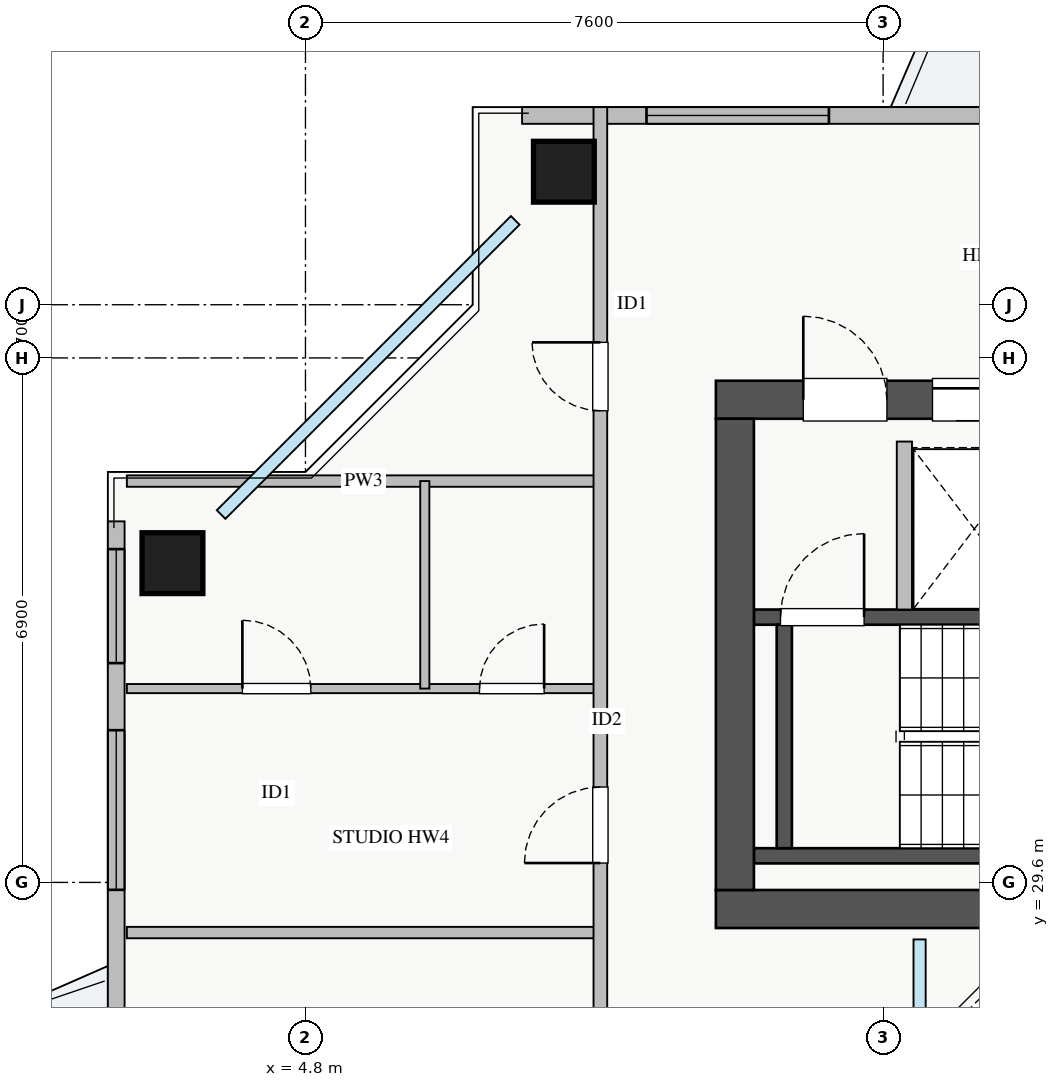
"""IFC4 building model, lengths in metres.
Left out: names, types, materials, properties, quantities, classifications, styles, units other than length and angle.
Written with IfcOpenShell. Run it as: python <this file> out.ifc"""

import sys

from ifc_helpers import new_model, si_unit, direction, frame, frame_2d, origin, origin_2d, place, context, subcontext, project, spatial, rectangle, extrude, source, transform, mapped, element, fill, save


model = new_model("IFC4")
c1 = context("Model", 3, precision=1e-05, world=origin(), true_north=direction((0.0, 1.0)))
c2 = subcontext(c1, "Body", "Model", "MODEL_VIEW")
j1 = project(units=[si_unit("LENGTHUNIT", "METRE"), si_unit("PLANEANGLEUNIT", "RADIAN")], contexts=[c1])
p1 = place(None, origin())
s1 = spatial("IfcSite", under=j1, at=p1, CompositionType="ELEMENT")
p2 = place(p1, origin())
s2 = spatial("IfcBuilding", under=s1, at=p2, CompositionType="ELEMENT")
p3 = place(p2, frame((0.0, 0.0, 216.5)))
s3 = spatial("IfcBuildingStorey", under=s2, at=p3, CompositionType="ELEMENT", Elevation=216.5)
p4 = place(p3, frame((12.68, 33.2, 0.0), z_axis=(0.0, 0.0, 1.0), x_axis=(1.0, 0.0, 0.0)))
e1 = element("IfcWall", 1, at=p4, inside=s3, PredefinedType="SHEAR", context=c2, shape_type="SweptSolid", body=[
    extrude(rectangle(XDim=1.94, YDim=0.18, at=frame_2d((0.97, 0.0))), origin(), (0.0, 0.0, 1.0), 3.07),
])
p5 = place(p3, frame((10.7, 29.95, 0.0), z_axis=(0.0, 0.0, 1.0), x_axis=(1.0, 0.0, 0.0)))
e2 = element("IfcWall", 2, at=p5, inside=s3, PredefinedType="SHEAR", context=c2, shape_type="SweptSolid", body=[
    extrude(rectangle(XDim=7.45, YDim=0.2, at=frame_2d((3.725, 0.0))), origin(), (0.0, 0.0, 1.0), 3.25),
])
p6 = place(p3, frame((10.7, 33.09, 0.0), z_axis=(0.0, 0.0, 1.0), x_axis=(1.0, 0.0, 0.0)))
e3 = element("IfcWall", 3, at=p6, inside=s3, PredefinedType="SHEAR", context=c2, shape_type="SweptSolid", body=[
    extrude(rectangle(XDim=7.45, YDim=0.2, at=frame_2d((3.725, 0.0))), origin(), (0.0, 0.0, 1.0), 3.25),
])
p7 = place(p6, frame((0.35, 0.0, 0.0)))
e4 = element("IfcOpeningElement", 4, at=p7, cuts=e3, PredefinedType="OPENING", context=c2, shape_type="SweptSolid", body=[
    extrude(rectangle(XDim=1.1, YDim=2.05, at=frame_2d((0.55, 1.025))), frame((0.0, 0.11, 0.0), z_axis=(0.0, -1.0, 0.0), x_axis=(1.0, 0.0, 0.0)), (0.0, 0.0, 1.0), 0.22),
])
p8 = place(p3, frame((11.1, 30.05, 0.0), z_axis=(0.0, 0.0, 1.0), x_axis=(0.0, 1.0, 0.0)))
e5 = element("IfcWall", 5, at=p8, inside=s3, PredefinedType="SHEAR", context=c2, shape_type="SweptSolid", body=[
    extrude(rectangle(XDim=2.94, YDim=0.2, at=frame_2d((1.47, 0.0))), origin(), (0.0, 0.0, 1.0), 3.25),
])
p9 = place(p3, frame((10.2, 29.25, 0.0), z_axis=(0.0, 0.0, 1.0), x_axis=(1.0, 0.0, 0.0)))
e6 = element("IfcWall", 6, at=p9, inside=s3, PredefinedType="SHEAR", context=c2, shape_type="SweptSolid", body=[
    extrude(rectangle(XDim=17.6, YDim=0.5, at=frame_2d((8.8, 0.0))), origin(), (0.0, 0.0, 1.0), 3.25),
])
p10 = place(p3, frame((10.2, 35.95, 0.0), z_axis=(0.0, 0.0, 1.0), x_axis=(1.0, 0.0, 0.0)))
e7 = element("IfcWall", 7, at=p10, inside=s3, PredefinedType="SHEAR", context=c2, shape_type="SweptSolid", body=[
    extrude(rectangle(XDim=17.6, YDim=0.5, at=frame_2d((8.8, 0.0))), origin(), (0.0, 0.0, 1.0), 3.25),
])
p11 = place(p10, frame((1.15, 0.0, 0.0)))
e8 = element("IfcOpeningElement", 8, at=p11, cuts=e7, PredefinedType="OPENING", context=c2, shape_type="SweptSolid", body=[
    extrude(rectangle(XDim=1.1, YDim=2.05, at=frame_2d((0.55, 1.025))), frame((0.0, 0.26, 0.0), z_axis=(0.0, -1.0, 0.0), x_axis=(1.0, 0.0, 0.0)), (0.0, 0.0, 1.0), 0.52),
])
p12 = place(p10, frame((8.3, 0.0, 0.0)))
e9 = element("IfcOpeningElement", 9, at=p12, cuts=e7, PredefinedType="OPENING", context=c2, shape_type="SweptSolid", body=[
    extrude(rectangle(XDim=1.1, YDim=2.05, at=frame_2d((0.55, 1.025))), frame((0.0, 0.26, 0.0), z_axis=(0.0, -1.0, 0.0), x_axis=(1.0, 0.0, 0.0)), (0.0, 0.0, 1.0), 0.52),
])
p13 = place(p10, frame((2.85, 0.0, 0.0)))
e10 = element("IfcOpeningElement", 10, at=p13, cuts=e7, PredefinedType="OPENING", context=c2, shape_type="SweptSolid", body=[
    extrude(rectangle(XDim=1.1, YDim=2.05, at=frame_2d((0.55, 1.025))), frame((0.0, 0.26, 0.0), z_axis=(0.0, -1.0, 0.0), x_axis=(1.0, 0.0, 0.0)), (0.0, 0.0, 1.0), 0.52),
])
p14 = place(p10, frame((5.8, 0.0, 0.0)))
e11 = element("IfcOpeningElement", 11, at=p14, cuts=e7, PredefinedType="OPENING", context=c2, shape_type="SweptSolid", body=[
    extrude(rectangle(XDim=1.0, YDim=2.05, at=frame_2d((0.5, 1.025))), frame((0.0, 0.26, 0.0), z_axis=(0.0, -1.0, 0.0), x_axis=(1.0, 0.0, 0.0)), (0.0, 0.0, 1.0), 0.52),
])
p15 = place(p10, frame((14.74, 0.0, 0.0)))
e12 = element("IfcOpeningElement", 12, at=p15, cuts=e7, PredefinedType="OPENING", context=c2, shape_type="SweptSolid", body=[
    extrude(rectangle(XDim=1.0, YDim=2.05, at=frame_2d((0.5, 1.025))), frame((0.0, 0.26, 0.0), z_axis=(0.0, -1.0, 0.0), x_axis=(1.0, 0.0, 0.0)), (0.0, 0.0, 1.0), 0.52),
])
p16 = place(p10, frame((10.175, 0.0, 0.0)))
e13 = element("IfcOpeningElement", 13, at=p16, cuts=e7, PredefinedType="OPENING", context=c2, shape_type="SweptSolid", body=[
    extrude(rectangle(XDim=1.0, YDim=2.05, at=frame_2d((0.5, 1.025))), frame((0.0, 0.26, 0.0), z_axis=(0.0, -1.0, 0.0), x_axis=(1.0, 0.0, 0.0)), (0.0, 0.0, 1.0), 0.52),
])
p17 = place(p10, frame((12.625, 0.0, 0.0)))
e14 = element("IfcOpeningElement", 14, at=p17, cuts=e7, PredefinedType="OPENING", context=c2, shape_type="SweptSolid", body=[
    extrude(rectangle(XDim=1.0, YDim=2.05, at=frame_2d((0.5, 1.025))), frame((0.0, 0.26, 0.0), z_axis=(0.0, -1.0, 0.0), x_axis=(1.0, 0.0, 0.0)), (0.0, 0.0, 1.0), 0.52),
])
p18 = place(p3, frame((10.45, 29.5, 0.0), z_axis=(0.0, 0.0, 1.0), x_axis=(0.0, 1.0, 0.0)))
e15 = element("IfcWall", 15, at=p18, inside=s3, PredefinedType="SHEAR", context=c2, shape_type="SweptSolid", body=[
    extrude(rectangle(XDim=6.2, YDim=0.5, at=frame_2d((3.1, 0.0))), origin(), (0.0, 0.0, 1.0), 3.25),
])
m1 = source(origin(), c2, "Body", "SweptSolid", [
    extrude(rectangle(XDim=0.8, YDim=0.8, at=origin_2d()), origin(), (0.0, 0.0, 1.0), 3.25),
])
for number, where, z_axis, x_axis in (
    (16, (8.2, 38.95, 0.0), (0.0, 0.0, 1.0), (1.0, 0.0, 0.0)),
    (17, (3.05, 33.8, 0.0), (0.0, 0.0, 1.0), (1.0, 0.0, 0.0)),
):
    element("IfcColumn", number, at=place(p3, frame(where, z_axis=z_axis, x_axis=x_axis)), inside=s3, PredefinedType="COLUMN", context=c2, shape_type="MappedRepresentation", body=[
        mapped(m1, transform((0.0, 0.0, 0.0), x_axis=(1.0, 0.0, 0.0), y_axis=(0.0, 1.0, 0.0), z_axis=(0.0, 0.0, 1.0), scale=1.0)),
    ])
p19 = place(p3, frame((7.65, 39.69, 0.0), z_axis=(0.0, 0.0, 1.0), x_axis=(1.0, 0.0, 0.0)))
e18 = element("IfcWall", 18, at=p19, inside=s3, PredefinedType="STANDARD", context=c2, shape_type="SweptSolid", body=[
    extrude(rectangle(XDim=22.7, YDim=0.22, at=frame_2d((11.35, 0.0))), origin(), (0.0, 0.0, 1.0), 2.61),
])
p20 = place(p19, frame((12.2, 0.0, 0.0)))
e19 = element("IfcOpeningElement", 19, at=p20, cuts=e18, PredefinedType="OPENING", context=c2, shape_type="SweptSolid", body=[
    extrude(rectangle(XDim=1.2, YDim=2.1, at=frame_2d((0.6, 1.05))), frame((0.0, 0.12, 0.0), z_axis=(0.0, -1.0, 0.0), x_axis=(1.0, 0.0, 0.0)), (0.0, 0.0, 1.0), 0.24),
])
p21 = place(p19, frame((1.637, 0.0, 0.9)))
e20 = element("IfcOpeningElement", 20, at=p21, cuts=e18, PredefinedType="OPENING", context=c2, shape_type="SweptSolid", body=[
    extrude(rectangle(XDim=2.4, YDim=1.48, at=frame_2d((1.2, 0.74))), frame((0.0, 0.12, 0.0), z_axis=(0.0, -1.0, 0.0), x_axis=(1.0, 0.0, 0.0)), (0.0, 0.0, 1.0), 0.24),
])
p22 = place(p19, frame((7.612, 0.0, 0.9)))
e21 = element("IfcOpeningElement", 21, at=p22, cuts=e18, PredefinedType="OPENING", context=c2, shape_type="SweptSolid", body=[
    extrude(rectangle(XDim=1.8, YDim=1.45, at=frame_2d((0.9, 0.725))), frame((0.0, 0.12, 0.0), z_axis=(0.0, -1.0, 0.0), x_axis=(1.0, 0.0, 0.0)), (0.0, 0.0, 1.0), 0.24),
])
p23 = place(p19, frame((20.038, 0.0, 0.9)))
e22 = element("IfcOpeningElement", 22, at=p23, cuts=e18, PredefinedType="OPENING", context=c2, shape_type="SweptSolid", body=[
    extrude(rectangle(XDim=2.1, YDim=1.5, at=frame_2d((1.05, 0.75))), frame((0.0, 0.12, 0.0), z_axis=(0.0, -1.0, 0.0), x_axis=(1.0, 0.0, 0.0)), (0.0, 0.0, 1.0), 0.24),
])
p24 = place(p19, frame((16.42, 0.0, 0.9)))
e23 = element("IfcOpeningElement", 23, at=p24, cuts=e18, PredefinedType="OPENING", context=c2, shape_type="SweptSolid", body=[
    extrude(rectangle(XDim=2.4, YDim=1.5, at=frame_2d((1.2, 0.75))), frame((0.0, 0.12, 0.0), z_axis=(0.0, -1.0, 0.0), x_axis=(1.0, 0.0, 0.0)), (0.0, 0.0, 1.0), 0.24),
])
p25 = place(p3, frame((2.31, 11.65, 0.0), z_axis=(0.0, 0.0, 1.0), x_axis=(0.0, 1.0, 0.0)))
e24 = element("IfcWall", 24, at=p25, inside=s3, PredefinedType="STANDARD", context=c2, shape_type="SweptSolid", body=[
    extrude(rectangle(XDim=22.7, YDim=0.22, at=frame_2d((11.35, 0.0))), origin(), (0.0, 0.0, 1.0), 2.61),
])
p26 = place(p25, frame((12.2, 0.0, 0.0)))
e25 = element("IfcOpeningElement", 25, at=p26, cuts=e24, PredefinedType="OPENING", context=c2, shape_type="SweptSolid", body=[
    extrude(rectangle(XDim=1.2, YDim=2.1, at=frame_2d((0.6, 1.05))), frame((0.0, 0.12, 0.0), z_axis=(0.0, -1.0, 0.0), x_axis=(1.0, 0.0, 0.0)), (0.0, 0.0, 1.0), 0.24),
])
p27 = place(p25, frame((2.607, 0.0, 0.9)))
e26 = element("IfcOpeningElement", 26, at=p27, cuts=e24, PredefinedType="OPENING", context=c2, shape_type="SweptSolid", body=[
    extrude(rectangle(XDim=1.8, YDim=1.5, at=frame_2d((0.9, 0.75))), frame((0.0, 0.12, 0.0), z_axis=(0.0, -1.0, 0.0), x_axis=(1.0, 0.0, 0.0)), (0.0, 0.0, 1.0), 0.24),
])
p28 = place(p25, frame((17.853, 0.0, 0.9)))
e27 = element("IfcOpeningElement", 27, at=p28, cuts=e24, PredefinedType="OPENING", context=c2, shape_type="SweptSolid", body=[
    extrude(rectangle(XDim=2.1, YDim=1.5, at=frame_2d((1.05, 0.75))), frame((0.0, 0.12, 0.0), z_axis=(0.0, -1.0, 0.0), x_axis=(1.0, 0.0, 0.0)), (0.0, 0.0, 1.0), 0.24),
])
p29 = place(p25, frame((0.385, 0.0, 0.9)))
e28 = element("IfcOpeningElement", 28, at=p29, cuts=e24, PredefinedType="OPENING", context=c2, shape_type="SweptSolid", body=[
    extrude(rectangle(XDim=1.5, YDim=1.5, at=frame_2d((0.75, 0.75))), frame((0.0, 0.12, 0.0), z_axis=(0.0, -1.0, 0.0), x_axis=(1.0, 0.0, 0.0)), (0.0, 0.0, 1.0), 0.24),
])
p30 = place(p25, frame((20.835, 0.0, 0.9)))
e29 = element("IfcOpeningElement", 29, at=p30, cuts=e24, PredefinedType="OPENING", context=c2, shape_type="SweptSolid", body=[
    extrude(rectangle(XDim=1.5, YDim=1.5, at=frame_2d((0.75, 0.75))), frame((0.0, 0.12, 0.0), z_axis=(0.0, -1.0, 0.0), x_axis=(1.0, 0.0, 0.0)), (0.0, 0.0, 1.0), 0.24),
])
p31 = place(p25, frame((5.025, 0.0, 0.9)))
e30 = element("IfcOpeningElement", 30, at=p31, cuts=e24, PredefinedType="OPENING", context=c2, shape_type="SweptSolid", body=[
    extrude(rectangle(XDim=0.9, YDim=1.2, at=frame_2d((0.45, 0.6))), frame((0.0, 0.12, 0.0), z_axis=(0.0, -1.0, 0.0), x_axis=(1.0, 0.0, 0.0)), (0.0, 0.0, 1.0), 0.24),
])
p32 = place(p3, frame((12.68, 33.19, 0.0), z_axis=(0.0, 0.0, 1.0), x_axis=(0.0, 1.0, 0.0)))
e31 = element("IfcWall", 31, at=p32, inside=s3, PredefinedType="PARTITIONING", context=c2, shape_type="SweptSolid", body=[
    extrude(rectangle(XDim=2.21, YDim=0.2, at=frame_2d((1.105, 0.0))), origin(), (0.0, 0.0, 1.0), 3.07),
])
p33 = place(p3, frame((2.45, 34.88, 0.0), z_axis=(0.0, 0.0, 1.0), x_axis=(1.0, 0.0, 0.0)))
e32 = element("IfcWall", 32, at=p33, inside=s3, PredefinedType="PARTITIONING", context=c2, shape_type="SweptSolid", body=[
    extrude(rectangle(XDim=6.23, YDim=0.15, at=frame_2d((3.115, 0.0))), origin(), (0.0, 0.0, 1.0), 3.07),
])
p34 = place(p3, frame((2.45, 32.15, 0.0), z_axis=(0.0, 0.0, 1.0), x_axis=(1.0, 0.0, 0.0)))
e33 = element("IfcWall", 33, at=p34, inside=s3, PredefinedType="PLUMBINGWALL", context=c2, shape_type="SweptSolid", body=[
    extrude(rectangle(XDim=6.23, YDim=0.12, at=frame_2d((3.115, 0.0))), origin(), (0.0, 0.0, 1.0), 3.07),
])
p35 = place(p34, frame((1.52, 0.0, 0.0)))
e34 = element("IfcOpeningElement", 34, at=p35, cuts=e33, PredefinedType="OPENING", context=c2, shape_type="SweptSolid", body=[
    extrude(rectangle(XDim=0.9, YDim=2.05, at=frame_2d((0.45, 1.025))), frame((0.0, 0.07, 0.0), z_axis=(0.0, -1.0, 0.0), x_axis=(1.0, 0.0, 0.0)), (0.0, 0.0, 1.0), 0.14),
])
p36 = place(p34, frame((4.64, 0.0, 0.0)))
e35 = element("IfcOpeningElement", 35, at=p36, cuts=e33, PredefinedType="OPENING", context=c2, shape_type="SweptSolid", body=[
    extrude(rectangle(XDim=0.85, YDim=2.05, at=frame_2d((0.425, 1.025))), frame((0.0, 0.07, 0.0), z_axis=(0.0, -1.0, 0.0), x_axis=(1.0, 0.0, 0.0)), (0.0, 0.0, 1.0), 0.14),
])
p37 = place(p3, frame((6.37, 32.15, 0.0), z_axis=(0.0, 0.0, 1.0), x_axis=(0.0, 1.0, 0.0)))
e36 = element("IfcWall", 36, at=p37, inside=s3, PredefinedType="PLUMBINGWALL", context=c2, shape_type="SweptSolid", body=[
    extrude(rectangle(XDim=2.73, YDim=0.12, at=frame_2d((1.365, 0.0))), origin(), (0.0, 0.0, 1.0), 3.07),
])
p38 = place(p3, frame((2.45, 28.94, 0.0), z_axis=(0.0, 0.0, 1.0), x_axis=(1.0, 0.0, 0.0)))
e37 = element("IfcWall", 37, at=p38, inside=s3, PredefinedType="PARTITIONING", context=c2, shape_type="SweptSolid", body=[
    extrude(rectangle(XDim=6.23, YDim=0.15, at=frame_2d((3.115, 0.0))), origin(), (0.0, 0.0, 1.0), 3.07),
])
p39 = place(p3, frame((8.68, 6.2, 0.0), z_axis=(0.0, 0.0, 1.0), x_axis=(0.0, 1.0, 0.0)))
e38 = element("IfcWall", 38, at=p39, inside=s3, PredefinedType="PARTITIONING", context=c2, shape_type="SweptSolid", body=[
    extrude(rectangle(XDim=33.6, YDim=0.18, at=frame_2d((16.8, 0.0))), origin(), (0.0, 0.0, 1.0), 3.07),
])
p40 = place(p39, frame((29.605, 0.0, 0.0)))
e39 = element("IfcOpeningElement", 39, at=p40, cuts=e38, PredefinedType="OPENING", context=c2, shape_type="SweptSolid", body=[
    extrude(rectangle(XDim=0.9, YDim=2.05, at=frame_2d((0.45, 1.025))), frame((0.0, 0.1, 0.0), z_axis=(0.0, -1.0, 0.0), x_axis=(1.0, 0.0, 0.0)), (0.0, 0.0, 1.0), 0.2),
])
p41 = place(p39, frame((2.92, 0.0, 0.0)))
e40 = element("IfcOpeningElement", 40, at=p41, cuts=e38, PredefinedType="OPENING", context=c2, shape_type="SweptSolid", body=[
    extrude(rectangle(XDim=0.9, YDim=2.05, at=frame_2d((0.45, 1.025))), frame((0.0, 0.1, 0.0), z_axis=(0.0, -1.0, 0.0), x_axis=(1.0, 0.0, 0.0)), (0.0, 0.0, 1.0), 0.2),
])
p42 = place(p39, frame((5.615, 0.0, 0.0)))
e41 = element("IfcOpeningElement", 41, at=p42, cuts=e38, PredefinedType="OPENING", context=c2, shape_type="SweptSolid", body=[
    extrude(rectangle(XDim=1.0, YDim=2.05, at=frame_2d((0.5, 1.025))), frame((0.0, 0.1, 0.0), z_axis=(0.0, -1.0, 0.0), x_axis=(1.0, 0.0, 0.0)), (0.0, 0.0, 1.0), 0.2),
])
p43 = place(p39, frame((10.54, 0.0, 0.0)))
e42 = element("IfcOpeningElement", 42, at=p43, cuts=e38, PredefinedType="OPENING", context=c2, shape_type="SweptSolid", body=[
    extrude(rectangle(XDim=1.0, YDim=2.05, at=frame_2d((0.5, 1.025))), frame((0.0, 0.1, 0.0), z_axis=(0.0, -1.0, 0.0), x_axis=(1.0, 0.0, 0.0)), (0.0, 0.0, 1.0), 0.2),
])
p44 = place(p39, frame((19.27, 0.0, 0.0)))
e43 = element("IfcOpeningElement", 43, at=p44, cuts=e38, PredefinedType="OPENING", context=c2, shape_type="SweptSolid", body=[
    extrude(rectangle(XDim=1.0, YDim=2.05, at=frame_2d((0.5, 1.025))), frame((0.0, 0.1, 0.0), z_axis=(0.0, -1.0, 0.0), x_axis=(1.0, 0.0, 0.0)), (0.0, 0.0, 1.0), 0.2),
])
p45 = place(p39, frame((23.655, 0.0, 0.0)))
e44 = element("IfcOpeningElement", 44, at=p45, cuts=e38, PredefinedType="OPENING", context=c2, shape_type="SweptSolid", body=[
    extrude(rectangle(XDim=1.0, YDim=2.05, at=frame_2d((0.5, 1.025))), frame((0.0, 0.1, 0.0), z_axis=(0.0, -1.0, 0.0), x_axis=(1.0, 0.0, 0.0)), (0.0, 0.0, 1.0), 0.2),
])
m2 = source(origin(), c2, "Body", "SweptSolid", [
    extrude(rectangle(XDim=2.4, YDim=1.48, at=frame_2d((1.2, 0.74))), frame((0.0, 0.03, 0.0), z_axis=(0.0, -1.0, 0.0), x_axis=(1.0, 0.0, 0.0)), (0.0, 0.0, 1.0), 0.06),
])
p46 = place(p21, origin())
e45 = element("IfcWindow", 45, at=p46, inside=s3, PartitioningType="TRIPLE_PANEL_VERTICAL", PredefinedType="WINDOW", context=c2, shape_type="MappedRepresentation", body=[
    mapped(m2, transform((0.0, 0.0, 0.0), x_axis=(1.0, 0.0, 0.0), y_axis=(0.0, 1.0, 0.0), z_axis=(0.0, 0.0, 1.0), scale=1.0)),
])
fill(e20, e45)
m3 = source(origin(), c2, "Body", "SweptSolid", [
    extrude(rectangle(XDim=2.1, YDim=1.5, at=frame_2d((1.05, 0.75))), frame((0.0, 0.03, 0.0), z_axis=(0.0, -1.0, 0.0), x_axis=(1.0, 0.0, 0.0)), (0.0, 0.0, 1.0), 0.06),
])
p47 = place(p28, origin())
e46 = element("IfcWindow", 46, at=p47, inside=s3, PartitioningType="TRIPLE_PANEL_VERTICAL", PredefinedType="WINDOW", context=c2, shape_type="MappedRepresentation", body=[
    mapped(m3, transform((0.0, 0.0, 0.0), x_axis=(1.0, 0.0, 0.0), y_axis=(0.0, 1.0, 0.0), z_axis=(0.0, 0.0, 1.0), scale=1.0)),
])
fill(e27, e46)
m4 = source(origin(), c2, "Body", "SweptSolid", [
    extrude(rectangle(XDim=1.1, YDim=2.05, at=frame_2d((0.55, 1.025))), frame((0.0, 0.025, 0.0), z_axis=(0.0, -1.0, 0.0), x_axis=(1.0, 0.0, 0.0)), (0.0, 0.0, 1.0), 0.05),
])
p48 = place(p11, origin())
e47 = element("IfcDoor", 47, at=p48, inside=s3, OperationType="SINGLE_SWING_LEFT", PredefinedType="DOOR", context=c2, shape_type="MappedRepresentation", body=[
    mapped(m4, transform((0.0, 0.0, 0.0), x_axis=(1.0, 0.0, 0.0), y_axis=(0.0, 1.0, 0.0), z_axis=(0.0, 0.0, 1.0), scale=1.0)),
])
fill(e8, e47)
p49 = place(p7, origin())
e48 = element("IfcDoor", 48, at=p49, inside=s3, OperationType="SINGLE_SWING_RIGHT", PredefinedType="DOOR", context=c2, shape_type="MappedRepresentation", body=[
    mapped(m4, transform((0.0, 0.0, 0.0), x_axis=(1.0, 0.0, 0.0), y_axis=(0.0, 1.0, 0.0), z_axis=(0.0, 0.0, 1.0), scale=1.0)),
])
fill(e4, e48)
p50 = place(p13, origin())
e49 = element("IfcDoor", 49, at=p50, inside=s3, OperationType="SLIDING_TO_LEFT", PredefinedType="DOOR", context=c2, shape_type="MappedRepresentation", body=[
    mapped(m4, transform((0.0, 0.0, 0.0), x_axis=(1.0, 0.0, 0.0), y_axis=(0.0, 1.0, 0.0), z_axis=(0.0, 0.0, 1.0), scale=1.0)),
])
fill(e10, e49)
m5 = source(origin(), c2, "Body", "SweptSolid", [
    extrude(rectangle(XDim=0.9, YDim=2.05, at=frame_2d((0.45, 1.025))), frame((0.0, 0.025, 0.0), z_axis=(0.0, -1.0, 0.0), x_axis=(1.0, 0.0, 0.0)), (0.0, 0.0, 1.0), 0.05),
])
p51 = place(p35, origin())
e50 = element("IfcDoor", 50, at=p51, inside=s3, OperationType="SINGLE_SWING_LEFT", PredefinedType="DOOR", context=c2, shape_type="MappedRepresentation", body=[
    mapped(m5, transform((0.0, 0.0, 0.0), x_axis=(1.0, 0.0, 0.0), y_axis=(0.0, 1.0, 0.0), z_axis=(0.0, 0.0, 1.0), scale=1.0)),
])
fill(e34, e50)
m6 = source(origin(), c2, "Body", "SweptSolid", [
    extrude(rectangle(XDim=0.85, YDim=2.05, at=frame_2d((0.425, 1.025))), frame((0.0, 0.025, 0.0), z_axis=(0.0, -1.0, 0.0), x_axis=(1.0, 0.0, 0.0)), (0.0, 0.0, 1.0), 0.05),
])
p52 = place(p36, origin())
e51 = element("IfcDoor", 51, at=p52, inside=s3, OperationType="SINGLE_SWING_RIGHT", PredefinedType="DOOR", context=c2, shape_type="MappedRepresentation", body=[
    mapped(m6, transform((0.0, 0.0, 0.0), x_axis=(1.0, 0.0, 0.0), y_axis=(0.0, 1.0, 0.0), z_axis=(0.0, 0.0, 1.0), scale=1.0)),
])
fill(e35, e51)
p53 = place(p40, origin())
e52 = element("IfcDoor", 52, at=p53, inside=s3, OperationType="SINGLE_SWING_RIGHT", PredefinedType="DOOR", context=c2, shape_type="MappedRepresentation", body=[
    mapped(m5, transform((0.0, 0.0, 0.0), x_axis=(1.0, 0.0, 0.0), y_axis=(0.0, 1.0, 0.0), z_axis=(0.0, 0.0, 1.0), scale=1.0)),
])
fill(e39, e52)
m7 = source(origin(), c2, "Body", "SweptSolid", [
    extrude(rectangle(XDim=1.0, YDim=2.05, at=frame_2d((0.5, 1.025))), frame((0.0, 0.025, 0.0), z_axis=(0.0, -1.0, 0.0), x_axis=(1.0, 0.0, 0.0)), (0.0, 0.0, 1.0), 0.05),
])
p54 = place(p45, origin())
e53 = element("IfcDoor", 53, at=p54, inside=s3, OperationType="SINGLE_SWING_LEFT", PredefinedType="DOOR", context=c2, shape_type="MappedRepresentation", body=[
    mapped(m7, transform((0.0, 0.0, 0.0), x_axis=(1.0, 0.0, 0.0), y_axis=(0.0, 1.0, 0.0), z_axis=(0.0, 0.0, 1.0), scale=1.0)),
])
fill(e44, e53)
m8 = source(origin(), c2, "Body", "SweptSolid", [
    extrude(rectangle(XDim=1.5, YDim=1.5, at=frame_2d((0.75, 0.75))), frame((0.0, 0.03, 0.0), z_axis=(0.0, -1.0, 0.0), x_axis=(1.0, 0.0, 0.0)), (0.0, 0.0, 1.0), 0.06),
])
p55 = place(p30, origin())
e54 = element("IfcWindow", 54, at=p55, inside=s3, PartitioningType="DOUBLE_PANEL_VERTICAL", PredefinedType="WINDOW", context=c2, shape_type="MappedRepresentation", body=[
    mapped(m8, transform((0.0, 0.0, 0.0), x_axis=(1.0, 0.0, 0.0), y_axis=(0.0, 1.0, 0.0), z_axis=(0.0, 0.0, 1.0), scale=1.0)),
])
fill(e29, e54)
save(model, sys.argv[1])
